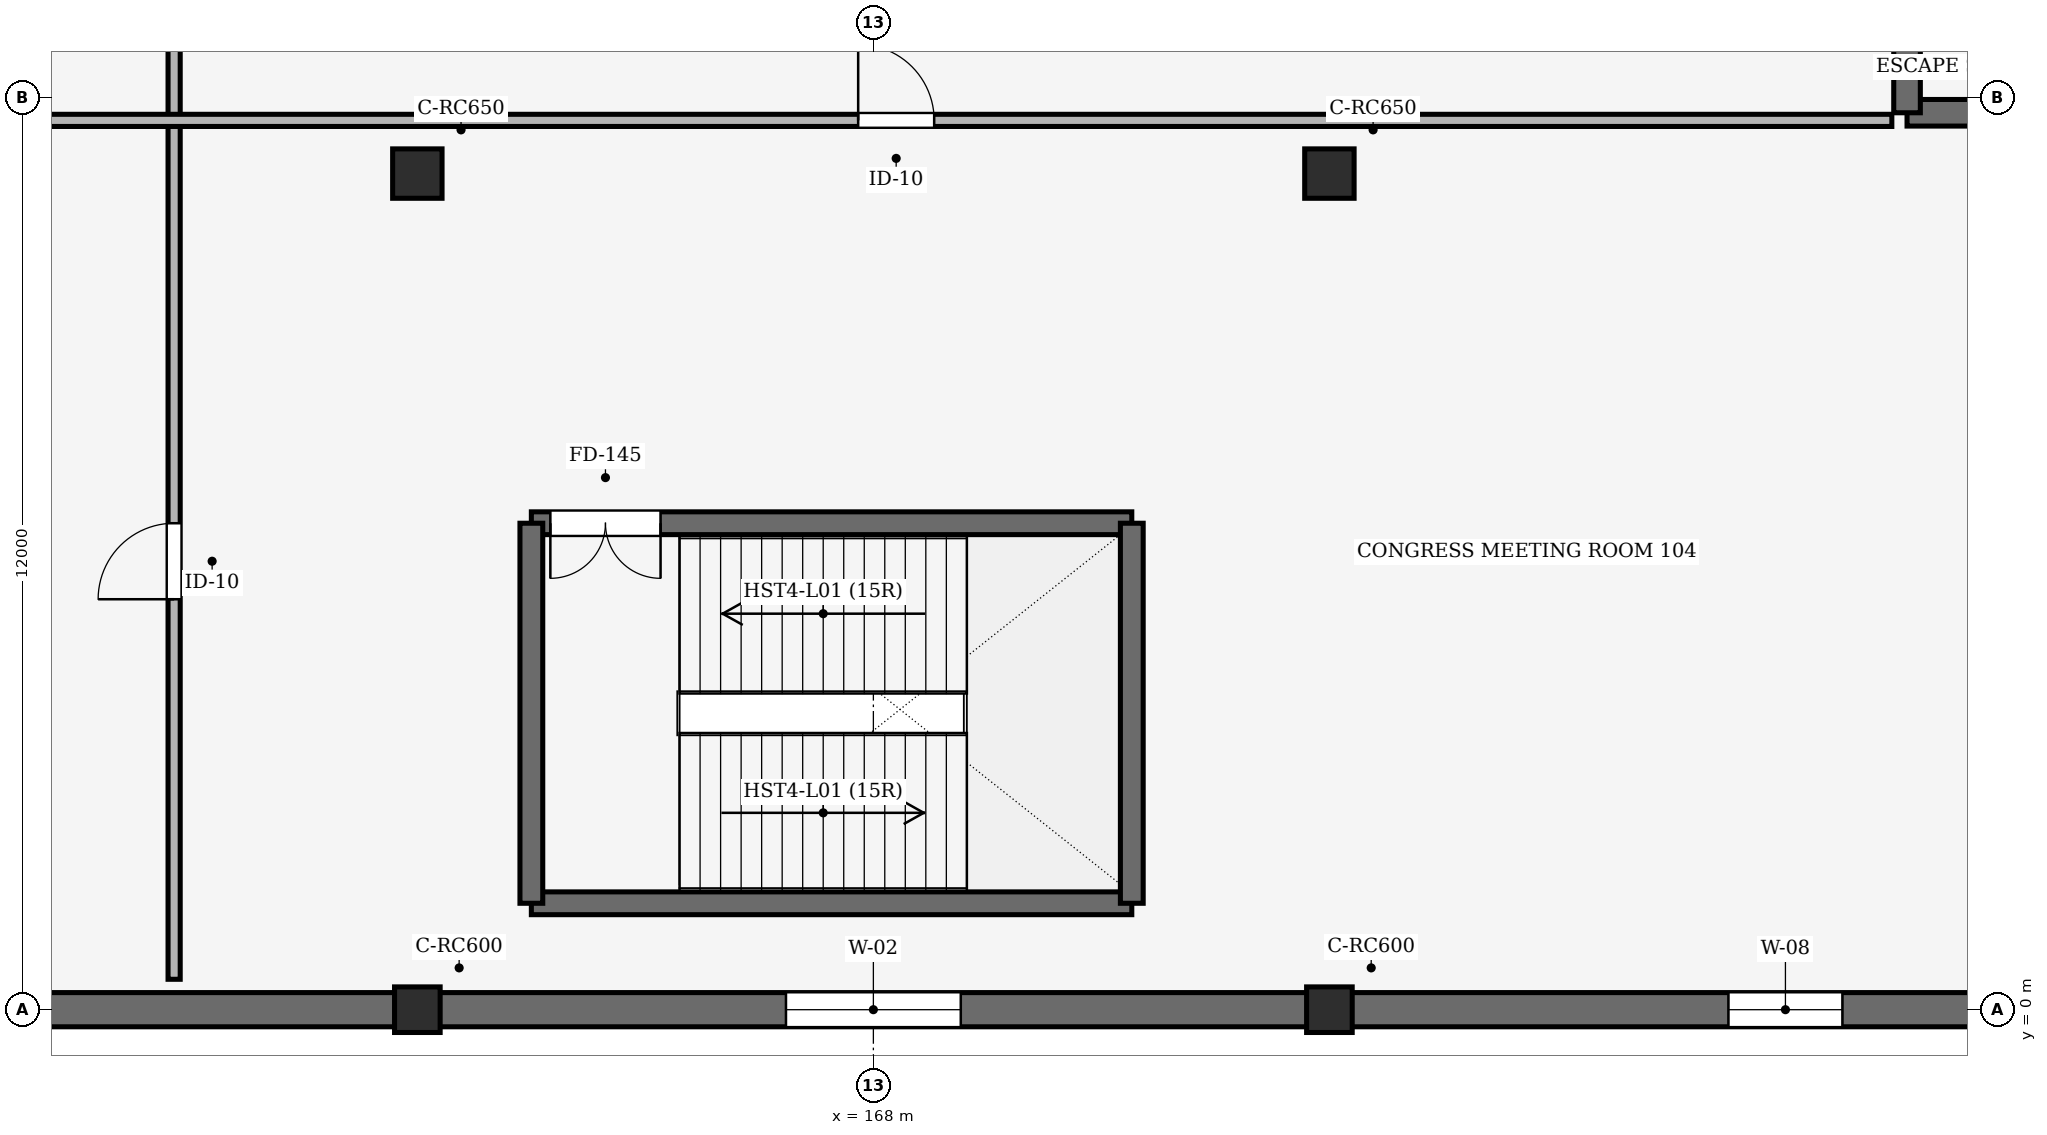
"""IFC4 building model, lengths in metres.
Left out: names, types, materials, properties, quantities, classifications, styles, units other than length and angle.
Written with IfcOpenShell. Run it as: python <this file> out.ifc"""

import sys

from ifc_helpers import new_model, si_unit, direction, frame, frame_2d, origin, origin_2d, place, context, subcontext, project, spatial, rectangle, extrude, element, fill, save


model = new_model("IFC4")
c1 = context("Model", 3, precision=1e-05, world=origin(), true_north=direction((0.0, 1.0)))
c2 = subcontext(c1, "Body", "Model", "MODEL_VIEW")
j1 = project(units=[si_unit("LENGTHUNIT", "METRE"), si_unit("PLANEANGLEUNIT", "RADIAN")], contexts=[c1])
p1 = place(None, origin())
s1 = spatial("IfcSite", under=j1, at=p1, CompositionType="ELEMENT")
p2 = place(p1, origin())
s2 = spatial("IfcBuilding", under=s1, at=p2, CompositionType="ELEMENT")
p3 = place(p2, frame((0.0, 0.0, 5.4)))
s3 = spatial("IfcBuildingStorey", under=s2, at=p3, CompositionType="ELEMENT", Elevation=5.4)
p4 = place(p3, frame((162.0, 0.0, 0.0), z_axis=(0.0, 0.0, 1.0), x_axis=(1.0, 0.0, 0.0)))
e1 = element("IfcColumn", 1, at=p4, inside=s3, PredefinedType="COLUMN", context=c2, shape_type="SweptSolid", body=[
    extrude(rectangle(XDim=0.6, YDim=0.6, at=origin_2d()), origin(), (0.0, 0.0, 1.0), 5.4),
])
p5 = place(p3, frame((162.0, 11.0, 0.0), z_axis=(0.0, 0.0, 1.0), x_axis=(1.0, 0.0, 0.0)))
e2 = element("IfcColumn", 2, at=p5, inside=s3, PredefinedType="COLUMN", context=c2, shape_type="SweptSolid", body=[
    extrude(rectangle(XDim=0.65, YDim=0.65, at=origin_2d()), origin(), (0.0, 0.0, 1.0), 5.4),
])
p6 = place(p3, frame((174.0, 0.0, 0.0), z_axis=(0.0, 0.0, 1.0), x_axis=(1.0, 0.0, 0.0)))
e3 = element("IfcColumn", 3, at=p6, inside=s3, PredefinedType="COLUMN", context=c2, shape_type="SweptSolid", body=[
    extrude(rectangle(XDim=0.6, YDim=0.6, at=origin_2d()), origin(), (0.0, 0.0, 1.0), 5.4),
])
p7 = place(p3, frame((174.0, 11.0, 0.0), z_axis=(0.0, 0.0, 1.0), x_axis=(1.0, 0.0, 0.0)))
e4 = element("IfcColumn", 4, at=p7, inside=s3, PredefinedType="COLUMN", context=c2, shape_type="SweptSolid", body=[
    extrude(rectangle(XDim=0.65, YDim=0.65, at=origin_2d()), origin(), (0.0, 0.0, 1.0), 5.4),
])
p8 = place(p3, frame((150.0, 0.0, 0.0), z_axis=(0.0, 0.0, 1.0), x_axis=(1.0, 0.0, 0.0)))
e5 = element("IfcWall", 5, at=p8, inside=s3, PredefinedType="SOLIDWALL", context=c2, shape_type="SweptSolid", body=[
    extrude(rectangle(XDim=12.0, YDim=0.45, at=frame_2d((6.0, 0.0))), origin(), (0.0, 0.0, 1.0), 4.3),
])
p9 = place(p8, frame((5.25, 0.0, 0.9)))
e6 = element("IfcOpeningElement", 6, at=p9, cuts=e5, PredefinedType="OPENING", context=c2, shape_type="SweptSolid", body=[
    extrude(rectangle(XDim=1.5, YDim=2.15, at=frame_2d((0.75, 1.075))), frame((0.0, 0.235, 0.0), z_axis=(0.0, -1.0, 0.0), x_axis=(1.0, 0.0, 0.0)), (0.0, 0.0, 1.0), 0.47),
])
p10 = place(p3, frame((162.0, 0.0, 0.0), z_axis=(0.0, 0.0, 1.0), x_axis=(1.0, 0.0, 0.0)))
e7 = element("IfcWall", 7, at=p10, inside=s3, PredefinedType="SOLIDWALL", context=c2, shape_type="SweptSolid", body=[
    extrude(rectangle(XDim=12.0, YDim=0.45, at=frame_2d((6.0, 0.0))), origin(), (0.0, 0.0, 1.0), 4.3),
])
p11 = place(p10, frame((4.85, 0.0, 0.9)))
e8 = element("IfcOpeningElement", 8, at=p11, cuts=e7, PredefinedType="OPENING", context=c2, shape_type="SweptSolid", body=[
    extrude(rectangle(XDim=2.3, YDim=3.1, at=frame_2d((1.15, 1.55))), frame((0.0, 0.235, 0.0), z_axis=(0.0, -1.0, 0.0), x_axis=(1.0, 0.0, 0.0)), (0.0, 0.0, 1.0), 0.47),
])
p12 = place(p3, frame((174.0, 0.0, 0.0), z_axis=(0.0, 0.0, 1.0), x_axis=(1.0, 0.0, 0.0)))
e9 = element("IfcWall", 9, at=p12, inside=s3, PredefinedType="SOLIDWALL", context=c2, shape_type="SweptSolid", body=[
    extrude(rectangle(XDim=12.0, YDim=0.45, at=frame_2d((6.0, 0.0))), origin(), (0.0, 0.0, 1.0), 4.3),
])
p13 = place(p12, frame((5.25, 0.0, 0.9)))
e10 = element("IfcOpeningElement", 10, at=p13, cuts=e9, PredefinedType="OPENING", context=c2, shape_type="SweptSolid", body=[
    extrude(rectangle(XDim=1.5, YDim=2.15, at=frame_2d((0.75, 1.075))), frame((0.0, 0.235, 0.0), z_axis=(0.0, -1.0, 0.0), x_axis=(1.0, 0.0, 0.0)), (0.0, 0.0, 1.0), 0.47),
])
p14 = place(p3, frame((181.6, 11.8, 0.0), z_axis=(0.0, 0.0, 1.0), x_axis=(1.0, 0.0, 0.0)))
e11 = element("IfcWall", 11, at=p14, inside=s3, PredefinedType="SHEAR", context=c2, shape_type="SweptSolid", body=[
    extrude(rectangle(XDim=10.2, YDim=0.35, at=frame_2d((5.1, 0.0))), origin(), (0.0, 0.0, 1.0), 5.4),
])
p15 = place(p3, frame((181.6, 20.2, 0.0), z_axis=(0.0, 0.0, 1.0), x_axis=(0.0, -1.0, 0.0)))
e12 = element("IfcWall", 12, at=p15, inside=s3, PredefinedType="SHEAR", context=c2, shape_type="SweptSolid", body=[
    extrude(rectangle(XDim=8.4, YDim=0.35, at=frame_2d((4.2, 0.0))), origin(), (0.0, 0.0, 1.0), 5.4),
])
p16 = place(p15, frame((2.95, 0.0, 0.0)))
e13 = element("IfcOpeningElement", 13, at=p16, cuts=e12, PredefinedType="OPENING", context=c2, shape_type="SweptSolid", body=[
    extrude(rectangle(XDim=1.15, YDim=2.15, at=frame_2d((0.575, 1.075))), frame((0.0, 0.185, 0.0), z_axis=(0.0, -1.0, 0.0), x_axis=(1.0, 0.0, 0.0)), (0.0, 0.0, 1.0), 0.37),
])
p17 = place(p3, frame((163.5, 1.4, 0.0), z_axis=(0.0, 0.0, 1.0), x_axis=(1.0, 0.0, 0.0)))
e14 = element("IfcWall", 14, at=p17, inside=s3, PredefinedType="SHEAR", context=c2, shape_type="SweptSolid", body=[
    extrude(rectangle(XDim=7.9, YDim=0.3, at=frame_2d((3.95, 0.0))), origin(), (0.0, 0.0, 1.0), 5.4),
])
p18 = place(p3, frame((171.4, 6.4, 0.0), z_axis=(0.0, 0.0, 1.0), x_axis=(-1.0, 0.0, 0.0)))
e15 = element("IfcWall", 15, at=p18, inside=s3, PredefinedType="SHEAR", context=c2, shape_type="SweptSolid", body=[
    extrude(rectangle(XDim=7.9, YDim=0.3, at=frame_2d((3.95, 0.0))), origin(), (0.0, 0.0, 1.0), 5.4),
])
p19 = place(p18, frame((6.2, 0.0, 0.0)))
e16 = element("IfcOpeningElement", 16, at=p19, cuts=e15, PredefinedType="OPENING", context=c2, shape_type="SweptSolid", body=[
    extrude(rectangle(XDim=1.45, YDim=2.15, at=frame_2d((0.725, 1.075))), frame((0.0, 0.16, 0.0), z_axis=(0.0, -1.0, 0.0), x_axis=(1.0, 0.0, 0.0)), (0.0, 0.0, 1.0), 0.32),
])
for number, where, z_axis, x_axis in (
    (17, (163.5, 6.4, 0.0), (0.0, 0.0, 1.0), (0.0, -1.0, 0.0)),
    (18, (171.4, 1.4, 0.0), (0.0, 0.0, 1.0), (0.0, 1.0, 0.0)),
):
    element("IfcWall", number, at=place(p3, frame(where, z_axis=z_axis, x_axis=x_axis)), inside=s3, PredefinedType="SHEAR", context=c2, shape_type="SweptSolid", body=[
        extrude(rectangle(XDim=5.0, YDim=0.3, at=frame_2d((2.5, 0.0))), origin(), (0.0, 0.0, 1.0), 5.4),
    ])
p20 = place(p3, frame((158.8, 0.4, 0.0), z_axis=(0.0, 0.0, 1.0), x_axis=(0.0, 1.0, 0.0)))
e19 = element("IfcWall", 19, at=p20, inside=s3, PredefinedType="PARTITIONING", context=c2, shape_type="SweptSolid", body=[
    extrude(rectangle(XDim=20.0, YDim=0.16, at=frame_2d((10.0, 0.0))), origin(), (0.0, 0.0, 1.0), 3.6),
])
p21 = place(p20, frame((5.0, 0.0, 0.0)))
e20 = element("IfcOpeningElement", 20, at=p21, cuts=e19, PredefinedType="OPENING", context=c2, shape_type="SweptSolid", body=[
    extrude(rectangle(XDim=1.0, YDim=2.15, at=frame_2d((0.5, 1.075))), frame((0.0, 0.09, 0.0), z_axis=(0.0, -1.0, 0.0), x_axis=(1.0, 0.0, 0.0)), (0.0, 0.0, 1.0), 0.18),
])
p22 = place(p3, frame((137.8, 11.7, 0.0), z_axis=(0.0, 0.0, 1.0), x_axis=(1.0, 0.0, 0.0)))
e21 = element("IfcWall", 21, at=p22, inside=s3, PredefinedType="PARTITIONING", context=c2, shape_type="SweptSolid", body=[
    extrude(rectangle(XDim=43.6, YDim=0.16, at=frame_2d((21.8, 0.0))), origin(), (0.0, 0.0, 1.0), 3.6),
])
p23 = place(p22, frame((8.0, 0.0, 0.0)))
e22 = element("IfcOpeningElement", 22, at=p23, cuts=e21, PredefinedType="OPENING", context=c2, shape_type="SweptSolid", body=[
    extrude(rectangle(XDim=1.0, YDim=2.15, at=frame_2d((0.5, 1.075))), frame((0.0, 0.09, 0.0), z_axis=(0.0, -1.0, 0.0), x_axis=(1.0, 0.0, 0.0)), (0.0, 0.0, 1.0), 0.18),
])
p24 = place(p22, frame((30.0, 0.0, 0.0)))
e23 = element("IfcOpeningElement", 23, at=p24, cuts=e21, PredefinedType="OPENING", context=c2, shape_type="SweptSolid", body=[
    extrude(rectangle(XDim=1.0, YDim=2.15, at=frame_2d((0.5, 1.075))), frame((0.0, 0.09, 0.0), z_axis=(0.0, -1.0, 0.0), x_axis=(1.0, 0.0, 0.0)), (0.0, 0.0, 1.0), 0.18),
])
p25 = place(p11, origin())
e24 = element("IfcWindow", 24, at=p25, inside=s3, PartitioningType="DOUBLE_PANEL_VERTICAL", PredefinedType="WINDOW", context=c2, shape_type="SweptSolid", body=[
    extrude(rectangle(XDim=2.3, YDim=3.1, at=frame_2d((1.15, 1.55))), frame((0.0, 0.03, 0.0), z_axis=(0.0, -1.0, 0.0), x_axis=(1.0, 0.0, 0.0)), (0.0, 0.0, 1.0), 0.06),
])
fill(e8, e24)
p26 = place(p13, origin())
e25 = element("IfcWindow", 25, at=p26, inside=s3, PartitioningType="DOUBLE_PANEL_VERTICAL", PredefinedType="WINDOW", context=c2, shape_type="SweptSolid", body=[
    extrude(rectangle(XDim=1.5, YDim=2.15, at=frame_2d((0.75, 1.075))), frame((0.0, 0.03, 0.0), z_axis=(0.0, -1.0, 0.0), x_axis=(1.0, 0.0, 0.0)), (0.0, 0.0, 1.0), 0.06),
])
fill(e10, e25)
p27 = place(p19, origin())
e26 = element("IfcDoor", 26, at=p27, inside=s3, OperationType="DOUBLE_DOOR_SINGLE_SWING", PredefinedType="DOOR", context=c2, shape_type="SweptSolid", body=[
    extrude(rectangle(XDim=1.45, YDim=2.15, at=frame_2d((0.725, 1.075))), frame((0.0, 0.025, 0.0), z_axis=(0.0, -1.0, 0.0), x_axis=(1.0, 0.0, 0.0)), (0.0, 0.0, 1.0), 0.05),
])
fill(e16, e26)
p28 = place(p21, origin())
e27 = element("IfcDoor", 27, at=p28, inside=s3, OperationType="SINGLE_SWING_LEFT", PredefinedType="DOOR", context=c2, shape_type="SweptSolid", body=[
    extrude(rectangle(XDim=1.0, YDim=2.15, at=frame_2d((0.5, 1.075))), frame((0.0, 0.025, 0.0), z_axis=(0.0, -1.0, 0.0), x_axis=(1.0, 0.0, 0.0)), (0.0, 0.0, 1.0), 0.05),
])
fill(e20, e27)
p29 = place(p24, origin())
e28 = element("IfcDoor", 28, at=p29, inside=s3, OperationType="SINGLE_SWING_LEFT", PredefinedType="DOOR", context=c2, shape_type="SweptSolid", body=[
    extrude(rectangle(XDim=1.0, YDim=2.15, at=frame_2d((0.5, 1.075))), frame((0.0, 0.025, 0.0), z_axis=(0.0, -1.0, 0.0), x_axis=(1.0, 0.0, 0.0)), (0.0, 0.0, 1.0), 0.05),
])
fill(e23, e28)
save(model, sys.argv[1])
